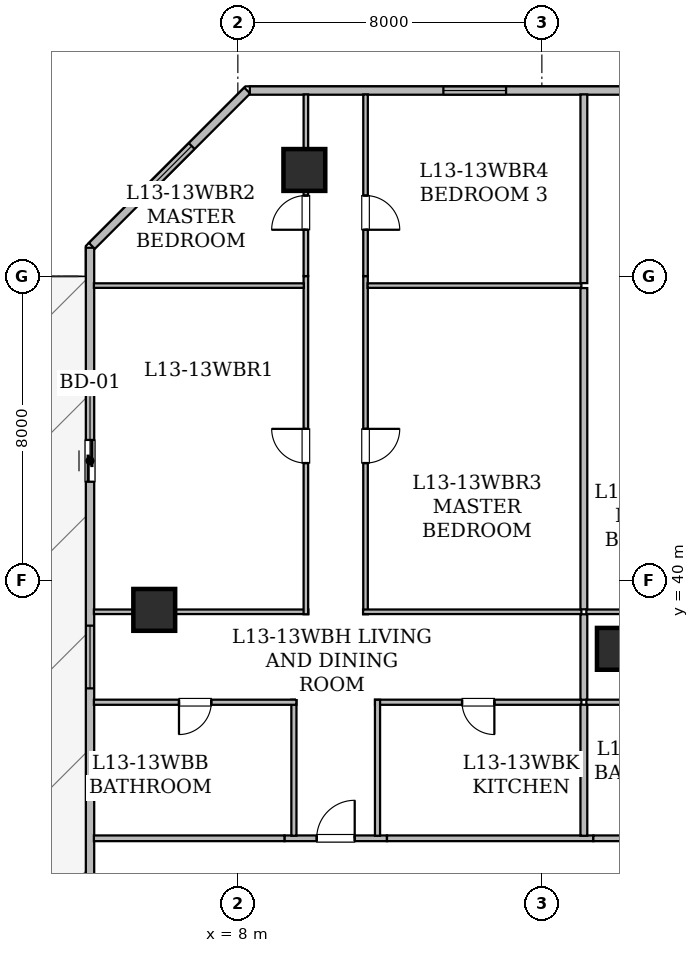
"""IFC4 building model, lengths in metres.
Left out: names, types, materials, properties, quantities, classifications, styles, units other than length and angle.
Written with IfcOpenShell. Run it as: python <this file> out.ifc"""

import sys

from ifc_helpers import new_model, si_unit, direction, frame, frame_2d, origin, origin_2d, place, context, subcontext, project, spatial, rectangle, hollow_rectangle, extrude, element, fill, save


model = new_model("IFC4")
c1 = context("Model", 3, precision=1e-05, world=origin(), true_north=direction((0.0, 1.0)))
c2 = subcontext(c1, "Body", "Model", "MODEL_VIEW")
j1 = project(units=[si_unit("LENGTHUNIT", "METRE"), si_unit("PLANEANGLEUNIT", "RADIAN")], contexts=[c1])
p1 = place(None, origin())
s1 = spatial("IfcSite", under=j1, at=p1, CompositionType="ELEMENT")
p2 = place(p1, origin())
s2 = spatial("IfcBuilding", under=s1, at=p2, CompositionType="ELEMENT")
p3 = place(p2, frame((0.0, 0.0, 55.2)))
s3 = spatial("IfcBuildingStorey", under=s2, at=p3, CompositionType="ELEMENT", Elevation=55.2)
for number, where, z_axis, x_axis in (
    (1, (9.75, 50.8, 0.0), (0.0, 0.0, 1.0), (1.0, 0.0, 0.0)),
    (2, (5.8, 39.225, 0.0), (0.0, 0.0, 1.0), (1.0, 0.0, 0.0)),
    (3, (18.0, 38.2, 0.0), (0.0, 0.0, 1.0), (1.0, 0.0, 0.0)),
):
    element("IfcColumn", number, at=place(p3, frame(where, z_axis=z_axis, x_axis=x_axis)), inside=s3, PredefinedType="COLUMN", context=c2, shape_type="SweptSolid", body=[
        extrude(hollow_rectangle(XDim=1.1, YDim=1.1, WallThickness=0.055, at=origin_2d()), origin(), (0.0, 0.0, 1.0), 3.65),
    ])
p4 = place(p3, frame((4.11, 31.295, 0.0), z_axis=(0.0, 0.0, 1.0), x_axis=(0.0, 1.0, 0.0)))
e4 = element("IfcWall", 4, at=p4, inside=s3, PredefinedType="STANDARD", context=c2, shape_type="SweptSolid", body=[
    extrude(rectangle(XDim=17.459, YDim=0.22, at=frame_2d((8.729, 0.0))), origin(), (0.0, 0.0, 1.0), 3.43),
])
p5 = place(p4, frame((11.302, 0.0, 0.0)))
e5 = element("IfcOpeningElement", 5, at=p5, cuts=e4, PredefinedType="OPENING", context=c2, shape_type="SweptSolid", body=[
    extrude(rectangle(XDim=1.1, YDim=2.2, at=frame_2d((0.55, 1.1))), frame((0.0, 0.12, 0.0), z_axis=(0.0, -1.0, 0.0), x_axis=(1.0, 0.0, 0.0)), (0.0, 0.0, 1.0), 0.24),
])
p6 = place(p4, frame((5.865, 0.0, 0.85)))
e6 = element("IfcOpeningElement", 6, at=p6, cuts=e4, PredefinedType="OPENING", context=c2, shape_type="SweptSolid", body=[
    extrude(rectangle(XDim=1.65, YDim=1.55, at=frame_2d((0.825, 0.775))), frame((0.0, 0.12, 0.0), z_axis=(0.0, -1.0, 0.0), x_axis=(1.0, 0.0, 0.0)), (0.0, 0.0, 1.0), 0.24),
])
p7 = place(p3, frame((4.158, 48.802, 0.0), z_axis=(0.0, 0.0, 1.0), x_axis=(0.70712789547, 0.707085666273, 0.0)))
e7 = element("IfcWall", 7, at=p7, inside=s3, PredefinedType="STANDARD", context=c2, shape_type="SweptSolid", body=[
    extrude(rectangle(XDim=5.781, YDim=0.22, at=frame_2d((2.891, 0.0))), origin(), (0.0, 0.0, 1.0), 3.43),
])
p8 = place(p7, frame((2.066, 0.0, 0.85)))
e8 = element("IfcOpeningElement", 8, at=p8, cuts=e7, PredefinedType="OPENING", context=c2, shape_type="SweptSolid", body=[
    extrude(rectangle(XDim=1.65, YDim=1.55, at=frame_2d((0.825, 0.775))), frame((0.0, 0.12, 0.0), z_axis=(0.0, -1.0, 0.0), x_axis=(1.0, 0.0, 0.0)), (0.0, 0.0, 1.0), 0.24),
])
p9 = place(p3, frame((8.315, 52.89, 0.0), z_axis=(0.0, 0.0, 1.0), x_axis=(1.0, 0.0, 0.0)))
e9 = element("IfcWall", 9, at=p9, inside=s3, PredefinedType="STANDARD", context=c2, shape_type="SweptSolid", body=[
    extrude(rectangle(XDim=37.439, YDim=0.22, at=frame_2d((18.719, 0.0))), origin(), (0.0, 0.0, 1.0), 3.43),
])
p10 = place(p9, frame((5.093, 0.0, 0.85)))
e10 = element("IfcOpeningElement", 10, at=p10, cuts=e9, PredefinedType="OPENING", context=c2, shape_type="SweptSolid", body=[
    extrude(rectangle(XDim=1.65, YDim=1.55, at=frame_2d((0.825, 0.775))), frame((0.0, 0.12, 0.0), z_axis=(0.0, -1.0, 0.0), x_axis=(1.0, 0.0, 0.0)), (0.0, 0.0, 1.0), 0.24),
])
p11 = place(p9, frame((13.055, 0.0, 0.8)))
e11 = element("IfcOpeningElement", 11, at=p11, cuts=e9, PredefinedType="OPENING", context=c2, shape_type="SweptSolid", body=[
    extrude(rectangle(XDim=1.2, YDim=1.5, at=frame_2d((0.6, 0.75))), frame((0.0, 0.12, 0.0), z_axis=(0.0, -1.0, 0.0), x_axis=(1.0, 0.0, 0.0)), (0.0, 0.0, 1.0), 0.24),
])
p12 = place(p9, frame((10.005, 0.0, 0.85)))
e12 = element("IfcOpeningElement", 12, at=p12, cuts=e9, PredefinedType="OPENING", context=c2, shape_type="SweptSolid", body=[
    extrude(rectangle(XDim=1.65, YDim=1.55, at=frame_2d((0.825, 0.775))), frame((0.0, 0.12, 0.0), z_axis=(0.0, -1.0, 0.0), x_axis=(1.0, 0.0, 0.0)), (0.0, 0.0, 1.0), 0.24),
])
p13 = place(p9, frame((15.655, 0.0, 0.85)))
e13 = element("IfcOpeningElement", 13, at=p13, cuts=e9, PredefinedType="OPENING", context=c2, shape_type="SweptSolid", body=[
    extrude(rectangle(XDim=1.65, YDim=1.55, at=frame_2d((0.825, 0.775))), frame((0.0, 0.12, 0.0), z_axis=(0.0, -1.0, 0.0), x_axis=(1.0, 0.0, 0.0)), (0.0, 0.0, 1.0), 0.24),
])
p14 = place(p9, frame((25.185, 0.0, 0.8)))
e14 = element("IfcOpeningElement", 14, at=p14, cuts=e9, PredefinedType="OPENING", context=c2, shape_type="SweptSolid", body=[
    extrude(rectangle(XDim=1.2, YDim=1.5, at=frame_2d((0.6, 0.75))), frame((0.0, 0.12, 0.0), z_axis=(0.0, -1.0, 0.0), x_axis=(1.0, 0.0, 0.0)), (0.0, 0.0, 1.0), 0.24),
])
p15 = place(p9, frame((20.935, 0.0, 0.85)))
e15 = element("IfcOpeningElement", 15, at=p15, cuts=e9, PredefinedType="OPENING", context=c2, shape_type="SweptSolid", body=[
    extrude(rectangle(XDim=1.65, YDim=1.55, at=frame_2d((0.825, 0.775))), frame((0.0, 0.12, 0.0), z_axis=(0.0, -1.0, 0.0), x_axis=(1.0, 0.0, 0.0)), (0.0, 0.0, 1.0), 0.24),
])
p16 = place(p9, frame((28.985, 0.0, 0.85)))
e16 = element("IfcOpeningElement", 16, at=p16, cuts=e9, PredefinedType="OPENING", context=c2, shape_type="SweptSolid", body=[
    extrude(rectangle(XDim=1.65, YDim=1.55, at=frame_2d((0.825, 0.775))), frame((0.0, 0.12, 0.0), z_axis=(0.0, -1.0, 0.0), x_axis=(1.0, 0.0, 0.0)), (0.0, 0.0, 1.0), 0.24),
])
p17 = place(p9, frame((33.49, 0.0, 0.85)))
e17 = element("IfcOpeningElement", 17, at=p17, cuts=e9, PredefinedType="OPENING", context=c2, shape_type="SweptSolid", body=[
    extrude(rectangle(XDim=1.65, YDim=1.55, at=frame_2d((0.825, 0.775))), frame((0.0, 0.12, 0.0), z_axis=(0.0, -1.0, 0.0), x_axis=(1.0, 0.0, 0.0)), (0.0, 0.0, 1.0), 0.24),
])
p18 = place(p9, frame((35.942, 0.0, 0.85)))
e18 = element("IfcOpeningElement", 18, at=p18, cuts=e9, PredefinedType="OPENING", context=c2, shape_type="SweptSolid", body=[
    extrude(rectangle(XDim=1.35, YDim=1.5, at=frame_2d((0.675, 0.75))), frame((0.0, 0.12, 0.0), z_axis=(0.0, -1.0, 0.0), x_axis=(1.0, 0.0, 0.0)), (0.0, 0.0, 1.0), 0.24),
])
p19 = place(p3, frame((9.226, 33.215, 0.0), z_axis=(0.0, 0.0, 1.0), x_axis=(1.0, 0.0, 0.0)))
e19 = element("IfcWall", 19, at=p19, inside=s3, PredefinedType="STANDARD", context=c2, shape_type="SweptSolid", body=[
    extrude(rectangle(XDim=2.698, YDim=0.15, at=frame_2d((1.349, 0.0))), origin(), (0.0, 0.0, 1.0), 3.43),
])
p20 = place(p19, frame((0.849, 0.0, 0.0)))
e20 = element("IfcOpeningElement", 20, at=p20, cuts=e19, PredefinedType="OPENING", context=c2, shape_type="SweptSolid", body=[
    extrude(rectangle(XDim=1.0, YDim=2.15, at=frame_2d((0.5, 1.075))), frame((0.0, 0.085, 0.0), z_axis=(0.0, -1.0, 0.0), x_axis=(1.0, 0.0, 0.0)), (0.0, 0.0, 1.0), 0.17),
])
p21 = place(p3, frame((4.212, 33.215, 0.0), z_axis=(0.0, 0.0, 1.0), x_axis=(1.0, 0.0, 0.0)))
e21 = element("IfcWall", 21, at=p21, inside=s3, PredefinedType="STANDARD", context=c2, shape_type="SweptSolid", body=[
    extrude(rectangle(XDim=5.014, YDim=0.15, at=frame_2d((2.507, 0.0))), origin(), (0.0, 0.0, 1.0), 2.803),
])
p22 = place(p3, frame((11.924, 33.215, 0.0), z_axis=(0.0, 0.0, 1.0), x_axis=(1.0, 0.0, 0.0)))
e22 = element("IfcWall", 22, at=p22, inside=s3, PredefinedType="STANDARD", context=c2, shape_type="SweptSolid", body=[
    extrude(rectangle(XDim=5.43, YDim=0.15, at=frame_2d((2.715, 0.0))), origin(), (0.0, 0.0, 1.0), 3.43),
])
p23 = place(p3, frame((17.354, 33.215, 0.0), z_axis=(0.0, 0.0, 1.0), x_axis=(1.0, 0.0, 0.0)))
e23 = element("IfcWall", 23, at=p23, inside=s3, PredefinedType="STANDARD", context=c2, shape_type="SweptSolid", body=[
    extrude(rectangle(XDim=3.267, YDim=0.15, at=frame_2d((1.634, 0.0))), origin(), (0.0, 0.0, 1.0), 2.647),
])
p24 = place(p3, frame((9.475, 33.282, 0.0), z_axis=(0.0, 0.0, 1.0), x_axis=(0.0, 1.0, 0.0)))
e24 = element("IfcWall", 24, at=p24, inside=s3, PredefinedType="PARTITIONING", context=c2, shape_type="SweptSolid", body=[
    extrude(rectangle(XDim=3.578, YDim=0.135, at=frame_2d((1.789, 0.0))), origin(), (0.0, 0.0, 1.0), 3.43),
])
p25 = place(p3, frame((9.54, 36.795, 0.0), z_axis=(0.0, 0.0, 1.0), x_axis=(-1.0, 0.0, 0.0)))
e25 = element("IfcWall", 25, at=p25, inside=s3, PredefinedType="PARTITIONING", context=c2, shape_type="SweptSolid", body=[
    extrude(rectangle(XDim=5.328, YDim=0.135, at=frame_2d((2.664, 0.0))), origin(), (0.0, 0.0, 1.0), 2.803),
])
p26 = place(p25, frame((2.239, 0.0, 0.0)))
e26 = element("IfcOpeningElement", 26, at=p26, cuts=e25, PredefinedType="OPENING", context=c2, shape_type="SweptSolid", body=[
    extrude(rectangle(XDim=0.85, YDim=2.1, at=frame_2d((0.425, 1.05))), frame((0.0, 0.077, 0.0), z_axis=(0.0, -1.0, 0.0), x_axis=(1.0, 0.0, 0.0)), (0.0, 0.0, 1.0), 0.155),
])
p27 = place(p3, frame((17.04, 36.795, 0.0), z_axis=(0.0, 0.0, 1.0), x_axis=(-1.0, 0.0, 0.0)))
e27 = element("IfcWall", 27, at=p27, inside=s3, PredefinedType="PARTITIONING", context=c2, shape_type="SweptSolid", body=[
    extrude(rectangle(XDim=5.43, YDim=0.135, at=frame_2d((2.715, 0.0))), origin(), (0.0, 0.0, 1.0), 3.43),
])
p28 = place(p27, frame((2.29, 0.0, 0.0)))
e28 = element("IfcOpeningElement", 28, at=p28, cuts=e27, PredefinedType="OPENING", context=c2, shape_type="SweptSolid", body=[
    extrude(rectangle(XDim=0.85, YDim=2.1, at=frame_2d((0.425, 1.05))), frame((0.0, 0.077, 0.0), z_axis=(0.0, -1.0, 0.0), x_axis=(1.0, 0.0, 0.0)), (0.0, 0.0, 1.0), 0.155),
])
p29 = place(p3, frame((11.675, 36.86, 0.0), z_axis=(0.0, 0.0, 1.0), x_axis=(0.0, -1.0, 0.0)))
e29 = element("IfcWall", 29, at=p29, inside=s3, PredefinedType="PARTITIONING", context=c2, shape_type="SweptSolid", body=[
    extrude(rectangle(XDim=3.578, YDim=0.135, at=frame_2d((1.789, 0.0))), origin(), (0.0, 0.0, 1.0), 3.43),
])
p30 = place(p3, frame((4.212, 39.175, 0.0), z_axis=(0.0, 0.0, 1.0), x_axis=(1.0, 0.0, 0.0)))
e30 = element("IfcWall", 30, at=p30, inside=s3, PredefinedType="PARTITIONING", context=c2, shape_type="SweptSolid", body=[
    extrude(rectangle(XDim=5.643, YDim=0.12, at=frame_2d((2.822, 0.0))), origin(), (0.0, 0.0, 1.0), 2.647),
])
p31 = place(p3, frame((9.79, 39.11, 0.0), z_axis=(0.0, 0.0, 1.0), x_axis=(0.0, 1.0, 0.0)))
e31 = element("IfcWall", 31, at=p31, inside=s3, PredefinedType="PARTITIONING", context=c2, shape_type="SweptSolid", body=[
    extrude(rectangle(XDim=8.898, YDim=0.12, at=frame_2d((4.449, 0.0))), origin(), (0.0, 0.0, 1.0), 2.957),
])
p32 = place(p31, frame((3.978, 0.0, 0.0)))
e32 = element("IfcOpeningElement", 32, at=p32, cuts=e31, PredefinedType="OPENING", context=c2, shape_type="SweptSolid", body=[
    extrude(rectangle(XDim=0.9, YDim=2.1, at=frame_2d((0.45, 1.05))), frame((0.0, 0.07, 0.0), z_axis=(0.0, -1.0, 0.0), x_axis=(1.0, 0.0, 0.0)), (0.0, 0.0, 1.0), 0.14),
])
p33 = place(p3, frame((9.79, 48.008, 0.0), z_axis=(0.0, 0.0, 1.0), x_axis=(0.0, 1.0, 0.0)))
e33 = element("IfcWall", 33, at=p33, inside=s3, PredefinedType="PARTITIONING", context=c2, shape_type="SweptSolid", body=[
    extrude(rectangle(XDim=4.78, YDim=0.12, at=frame_2d((2.39, 0.0))), origin(), (0.0, 0.0, 1.0), 2.647),
])
p34 = place(p33, frame((1.219, 0.0, 0.0)))
e34 = element("IfcOpeningElement", 34, at=p34, cuts=e33, PredefinedType="OPENING", context=c2, shape_type="SweptSolid", body=[
    extrude(rectangle(XDim=0.9, YDim=2.1, at=frame_2d((0.45, 1.05))), frame((0.0, 0.07, 0.0), z_axis=(0.0, -1.0, 0.0), x_axis=(1.0, 0.0, 0.0)), (0.0, 0.0, 1.0), 0.14),
])
p35 = place(p3, frame((11.36, 48.008, 0.0), z_axis=(0.0, 0.0, 1.0), x_axis=(0.0, -1.0, 0.0)))
e35 = element("IfcWall", 35, at=p35, inside=s3, PredefinedType="PARTITIONING", context=c2, shape_type="SweptSolid", body=[
    extrude(rectangle(XDim=8.898, YDim=0.12, at=frame_2d((4.449, 0.0))), origin(), (0.0, 0.0, 1.0), 2.647),
])
p36 = place(p35, frame((4.02, 0.0, 0.0)))
e36 = element("IfcOpeningElement", 36, at=p36, cuts=e35, PredefinedType="OPENING", context=c2, shape_type="SweptSolid", body=[
    extrude(rectangle(XDim=0.9, YDim=2.1, at=frame_2d((0.45, 1.05))), frame((0.0, 0.07, 0.0), z_axis=(0.0, -1.0, 0.0), x_axis=(1.0, 0.0, 0.0)), (0.0, 0.0, 1.0), 0.14),
])
p37 = place(p3, frame((11.295, 39.175, 0.0), z_axis=(0.0, 0.0, 1.0), x_axis=(1.0, 0.0, 0.0)))
e37 = element("IfcWall", 37, at=p37, inside=s3, PredefinedType="PARTITIONING", context=c2, shape_type="SweptSolid", body=[
    extrude(rectangle(XDim=5.745, YDim=0.12, at=frame_2d((2.873, 0.0))), origin(), (0.0, 0.0, 1.0), 3.43),
])
p38 = place(p3, frame((11.36, 52.788, 0.0), z_axis=(0.0, 0.0, 1.0), x_axis=(0.0, -1.0, 0.0)))
e38 = element("IfcWall", 38, at=p38, inside=s3, PredefinedType="PARTITIONING", context=c2, shape_type="SweptSolid", body=[
    extrude(rectangle(XDim=4.78, YDim=0.12, at=frame_2d((2.39, 0.0))), origin(), (0.0, 0.0, 1.0), 2.647),
])
p39 = place(p38, frame((2.661, 0.0, 0.0)))
e39 = element("IfcOpeningElement", 39, at=p39, cuts=e38, PredefinedType="OPENING", context=c2, shape_type="SweptSolid", body=[
    extrude(rectangle(XDim=0.9, YDim=2.1, at=frame_2d((0.45, 1.05))), frame((0.0, 0.07, 0.0), z_axis=(0.0, -1.0, 0.0), x_axis=(1.0, 0.0, 0.0)), (0.0, 0.0, 1.0), 0.14),
])
p40 = place(p3, frame((17.105, 39.11, 0.0), z_axis=(0.0, 0.0, 1.0), x_axis=(0.0, -1.0, 0.0)))
e40 = element("IfcWall", 40, at=p40, inside=s3, PredefinedType="STANDARD", context=c2, shape_type="SweptSolid", body=[
    extrude(rectangle(XDim=2.25, YDim=0.18, at=frame_2d((1.125, 0.0))), origin(), (0.0, 0.0, 1.0), 2.647),
])
p41 = place(p3, frame((17.105, 36.73, 0.0), z_axis=(0.0, 0.0, 1.0), x_axis=(0.0, -1.0, 0.0)))
e41 = element("IfcWall", 41, at=p41, inside=s3, PredefinedType="STANDARD", context=c2, shape_type="SweptSolid", body=[
    extrude(rectangle(XDim=3.448, YDim=0.18, at=frame_2d((1.724, 0.0))), origin(), (0.0, 0.0, 1.0), 3.43),
])
p42 = place(p3, frame((4.212, 47.758, 0.0), z_axis=(0.0, 0.0, 1.0), x_axis=(1.0, 0.0, 0.0)))
e42 = element("IfcWall", 42, at=p42, inside=s3, PredefinedType="PARTITIONING", context=c2, shape_type="SweptSolid", body=[
    extrude(rectangle(XDim=5.524, YDim=0.12, at=frame_2d((2.762, 0.0))), origin(), (0.0, 0.0, 1.0), 2.803),
])
p43 = place(p3, frame((11.414, 47.758, 0.0), z_axis=(0.0, 0.0, 1.0), x_axis=(1.0, 0.0, 0.0)))
e43 = element("IfcWall", 43, at=p43, inside=s3, PredefinedType="PARTITIONING", context=c2, shape_type="SweptSolid", body=[
    extrude(rectangle(XDim=5.626, YDim=0.12, at=frame_2d((2.813, 0.0))), origin(), (0.0, 0.0, 1.0), 2.647),
])
p44 = place(p3, frame((17.105, 47.693, 0.0), z_axis=(0.0, 0.0, 1.0), x_axis=(0.0, -1.0, 0.0)))
e44 = element("IfcWall", 44, at=p44, inside=s3, PredefinedType="STANDARD", context=c2, shape_type="SweptSolid", body=[
    extrude(rectangle(XDim=8.453, YDim=0.18, at=frame_2d((4.227, 0.0))), origin(), (0.0, 0.0, 1.0), 2.647),
])
p45 = place(p3, frame((17.105, 52.788, 0.0), z_axis=(0.0, 0.0, 1.0), x_axis=(0.0, -1.0, 0.0)))
e45 = element("IfcWall", 45, at=p45, inside=s3, PredefinedType="STANDARD", context=c2, shape_type="SweptSolid", body=[
    extrude(rectangle(XDim=4.965, YDim=0.18, at=frame_2d((2.482, 0.0))), origin(), (0.0, 0.0, 1.0), 2.803),
])
p46 = place(p3, frame((20.935, 36.795, 0.0), z_axis=(0.0, 0.0, 1.0), x_axis=(-1.0, 0.0, 0.0)))
e46 = element("IfcWall", 46, at=p46, inside=s3, PredefinedType="PARTITIONING", context=c2, shape_type="SweptSolid", body=[
    extrude(rectangle(XDim=3.765, YDim=0.135, at=frame_2d((1.883, 0.0))), origin(), (0.0, 0.0, 1.0), 2.647),
])
p47 = place(p46, frame((1.458, 0.0, 0.0)))
e47 = element("IfcOpeningElement", 47, at=p47, cuts=e46, PredefinedType="OPENING", context=c2, shape_type="SweptSolid", body=[
    extrude(rectangle(XDim=0.85, YDim=2.1, at=frame_2d((0.425, 1.05))), frame((0.0, 0.077, 0.0), z_axis=(0.0, -1.0, 0.0), x_axis=(1.0, 0.0, 0.0)), (0.0, 0.0, 1.0), 0.155),
])
p48 = place(p3, frame((17.17, 39.175, 0.0), z_axis=(0.0, 0.0, 1.0), x_axis=(1.0, 0.0, 0.0)))
e48 = element("IfcWall", 48, at=p48, inside=s3, PredefinedType="PARTITIONING", context=c2, shape_type="SweptSolid", body=[
    extrude(rectangle(XDim=4.08, YDim=0.12, at=frame_2d((2.04, 0.0))), origin(), (0.0, 0.0, 1.0), 2.647),
])
p49 = place(p5, origin())
e49 = element("IfcDoor", 49, at=p49, inside=s3, OperationType="SLIDING_TO_LEFT", PredefinedType="DOOR", context=c2, shape_type="SweptSolid", body=[
    extrude(rectangle(XDim=1.1, YDim=2.2, at=frame_2d((0.55, 1.1))), frame((0.0, 0.025, 0.0), z_axis=(0.0, -1.0, 0.0), x_axis=(1.0, 0.0, 0.0)), (0.0, 0.0, 1.0), 0.05),
])
fill(e5, e49)
p50 = place(p6, origin())
e50 = element("IfcWindow", 50, at=p50, inside=s3, PartitioningType="SINGLE_PANEL", PredefinedType="WINDOW", context=c2, shape_type="SweptSolid", body=[
    extrude(rectangle(XDim=1.65, YDim=1.55, at=frame_2d((0.825, 0.775))), frame((0.0, 0.03, 0.0), z_axis=(0.0, -1.0, 0.0), x_axis=(1.0, 0.0, 0.0)), (0.0, 0.0, 1.0), 0.06),
])
fill(e6, e50)
p51 = place(p8, origin())
e51 = element("IfcWindow", 51, at=p51, inside=s3, PartitioningType="SINGLE_PANEL", PredefinedType="WINDOW", context=c2, shape_type="SweptSolid", body=[
    extrude(rectangle(XDim=1.65, YDim=1.55, at=frame_2d((0.825, 0.775))), frame((0.0, 0.03, 0.0), z_axis=(0.0, -1.0, 0.0), x_axis=(1.0, 0.0, 0.0)), (0.0, 0.0, 1.0), 0.06),
])
fill(e8, e51)
p52 = place(p10, origin())
e52 = element("IfcWindow", 52, at=p52, inside=s3, PartitioningType="SINGLE_PANEL", PredefinedType="WINDOW", context=c2, shape_type="SweptSolid", body=[
    extrude(rectangle(XDim=1.65, YDim=1.55, at=frame_2d((0.825, 0.775))), frame((0.0, 0.03, 0.0), z_axis=(0.0, -1.0, 0.0), x_axis=(1.0, 0.0, 0.0)), (0.0, 0.0, 1.0), 0.06),
])
fill(e10, e52)
p53 = place(p20, origin())
e53 = element("IfcDoor", 53, at=p53, inside=s3, OperationType="SINGLE_SWING_RIGHT", PredefinedType="DOOR", context=c2, shape_type="SweptSolid", body=[
    extrude(rectangle(XDim=1.0, YDim=2.15, at=frame_2d((0.5, 1.075))), frame((0.0, 0.025, 0.0), z_axis=(0.0, -1.0, 0.0), x_axis=(1.0, 0.0, 0.0)), (0.0, 0.0, 1.0), 0.05),
])
fill(e20, e53)
p54 = place(p26, origin())
e54 = element("IfcDoor", 54, at=p54, inside=s3, OperationType="SINGLE_SWING_RIGHT", PredefinedType="DOOR", context=c2, shape_type="SweptSolid", body=[
    extrude(rectangle(XDim=0.85, YDim=2.1, at=frame_2d((0.425, 1.05))), frame((0.0, 0.025, 0.0), z_axis=(0.0, -1.0, 0.0), x_axis=(1.0, 0.0, 0.0)), (0.0, 0.0, 1.0), 0.05),
])
fill(e26, e54)
p55 = place(p28, origin())
e55 = element("IfcDoor", 55, at=p55, inside=s3, OperationType="SINGLE_SWING_LEFT", PredefinedType="DOOR", context=c2, shape_type="SweptSolid", body=[
    extrude(rectangle(XDim=0.85, YDim=2.1, at=frame_2d((0.425, 1.05))), frame((0.0, 0.025, 0.0), z_axis=(0.0, -1.0, 0.0), x_axis=(1.0, 0.0, 0.0)), (0.0, 0.0, 1.0), 0.05),
])
fill(e28, e55)
p56 = place(p32, origin())
e56 = element("IfcDoor", 56, at=p56, inside=s3, OperationType="SINGLE_SWING_RIGHT", PredefinedType="DOOR", context=c2, shape_type="SweptSolid", body=[
    extrude(rectangle(XDim=0.9, YDim=2.1, at=frame_2d((0.45, 1.05))), frame((0.0, 0.025, 0.0), z_axis=(0.0, -1.0, 0.0), x_axis=(1.0, 0.0, 0.0)), (0.0, 0.0, 1.0), 0.05),
])
fill(e32, e56)
p57 = place(p34, origin())
e57 = element("IfcDoor", 57, at=p57, inside=s3, OperationType="SINGLE_SWING_LEFT", PredefinedType="DOOR", context=c2, shape_type="SweptSolid", body=[
    extrude(rectangle(XDim=0.9, YDim=2.1, at=frame_2d((0.45, 1.05))), frame((0.0, 0.025, 0.0), z_axis=(0.0, -1.0, 0.0), x_axis=(1.0, 0.0, 0.0)), (0.0, 0.0, 1.0), 0.05),
])
fill(e34, e57)
p58 = place(p36, origin())
e58 = element("IfcDoor", 58, at=p58, inside=s3, OperationType="SINGLE_SWING_LEFT", PredefinedType="DOOR", context=c2, shape_type="SweptSolid", body=[
    extrude(rectangle(XDim=0.9, YDim=2.1, at=frame_2d((0.45, 1.05))), frame((0.0, 0.025, 0.0), z_axis=(0.0, -1.0, 0.0), x_axis=(1.0, 0.0, 0.0)), (0.0, 0.0, 1.0), 0.05),
])
fill(e36, e58)
p59 = place(p39, origin())
e59 = element("IfcDoor", 59, at=p59, inside=s3, OperationType="SINGLE_SWING_RIGHT", PredefinedType="DOOR", context=c2, shape_type="SweptSolid", body=[
    extrude(rectangle(XDim=0.9, YDim=2.1, at=frame_2d((0.45, 1.05))), frame((0.0, 0.025, 0.0), z_axis=(0.0, -1.0, 0.0), x_axis=(1.0, 0.0, 0.0)), (0.0, 0.0, 1.0), 0.05),
])
fill(e39, e59)
save(model, sys.argv[1])
